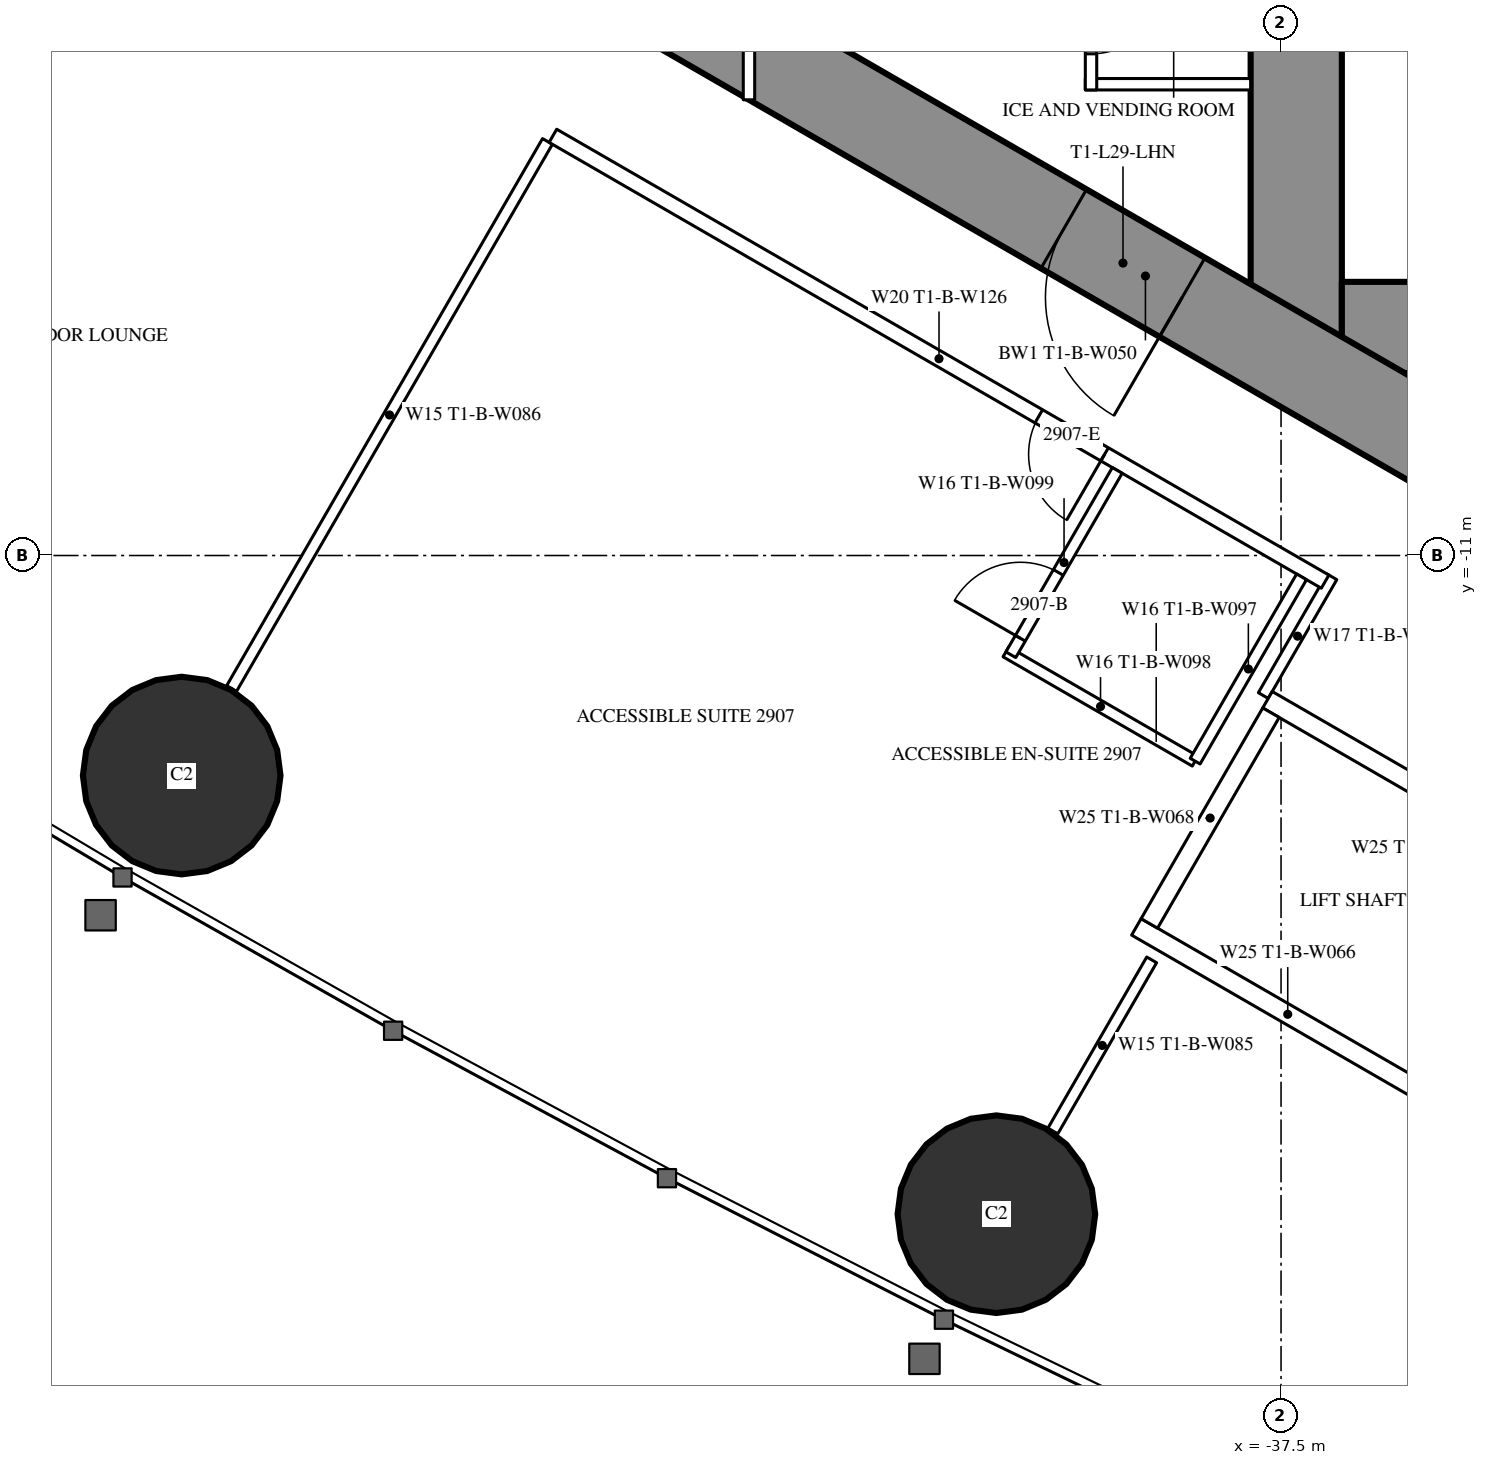
"""IFC4 building model, lengths in metres.
Left out: names, types, materials, properties, quantities, classifications, styles, units other than length and angle.
Written with IfcOpenShell. Run it as: python <this file> out.ifc"""

import sys

from ifc_helpers import new_model, si_unit, direction, frame, frame_2d, origin, origin_2d, place, context, subcontext, project, spatial, rectangle, hollow_circle, extrude, element, fill, save


model = new_model("IFC4")
c1 = context("Model", 3, precision=1e-05, world=origin(), true_north=direction((0.0, 1.0)))
c2 = subcontext(c1, "Body", "Model", "MODEL_VIEW")
j1 = project(units=[si_unit("LENGTHUNIT", "METRE"), si_unit("PLANEANGLEUNIT", "RADIAN")], contexts=[c1])
p1 = place(None, origin())
s1 = spatial("IfcSite", under=j1, at=p1, CompositionType="ELEMENT")
p2 = place(p1, origin())
s2 = spatial("IfcBuilding", under=s1, at=p2, CompositionType="ELEMENT")
p3 = place(p2, frame((0.0, 0.0, 111.6)))
s3 = spatial("IfcBuildingStorey", under=s2, at=p3, CompositionType="ELEMENT", Elevation=111.6)
for number, where, z_axis, x_axis in (
    (1, (-51.963, -13.895, 0.0), (0.0, 0.0, 1.0), (1.0, 0.0, 0.0)),
    (2, (-41.245, -19.666, 0.0), (0.0, 0.0, 1.0), (1.0, 0.0, 0.0)),
):
    element("IfcColumn", number, at=place(p3, frame(where, z_axis=z_axis, x_axis=x_axis)), inside=s3, PredefinedType="COLUMN", context=c2, shape_type="SweptSolid", body=[
        extrude(hollow_circle(Radius=1.3, WallThickness=0.1, at=origin_2d()), origin(), (0.0, 0.0, 1.0), 3.5),
    ])
p4 = place(p3, frame((-37.3, 8.6, 0.0), z_axis=(0.0, 0.0, 1.0), x_axis=(0.0, -1.0, 0.0)))
e3 = element("IfcWall", 3, at=p4, inside=s3, PredefinedType="SHEAR", context=c2, shape_type="SweptSolid", body=[
    extrude(rectangle(XDim=17.2, YDim=1.2, at=frame_2d((8.6, 0.0))), origin(), (0.0, 0.0, 1.0), 3.5),
])
p5 = place(p4, frame((7.7, 0.0, 0.0)))
e4 = element("IfcOpeningElement", 4, at=p5, cuts=e3, PredefinedType="OPENING", context=c2, shape_type="SweptSolid", body=[
    extrude(rectangle(XDim=1.8, YDim=2.2, at=frame_2d((0.9, 1.1))), frame((0.0, 0.61, 0.0), z_axis=(0.0, -1.0, 0.0), x_axis=(1.0, 0.0, 0.0)), (0.0, 0.0, 1.0), 1.22),
])
p6 = place(p3, frame((-28.3, -8.0, 0.0), z_axis=(0.0, 0.0, 1.0), x_axis=(-1.0, 0.0, 0.0)))
e5 = element("IfcWall", 5, at=p6, inside=s3, PredefinedType="SHEAR", context=c2, shape_type="SweptSolid", body=[
    extrude(rectangle(XDim=8.4, YDim=1.2, at=frame_2d((4.2, 0.0))), origin(), (0.0, 0.0, 1.0), 3.5),
])
p7 = place(p6, frame((0.25, 0.0, 0.0)))
e6 = element("IfcOpeningElement", 6, at=p7, cuts=e5, PredefinedType="OPENING", context=c2, shape_type="SweptSolid", body=[
    extrude(rectangle(XDim=1.0, YDim=2.2, at=frame_2d((0.5, 1.1))), frame((0.0, 0.61, 0.0), z_axis=(0.0, -1.0, 0.0), x_axis=(1.0, 0.0, 0.0)), (0.0, 0.0, 1.0), 1.22),
])
p8 = place(p3, frame((-27.2, -14.3, 0.0), z_axis=(0.0, 0.0, 1.0), x_axis=(-0.866024021859, 0.500002393557, 0.0)))
e7 = element("IfcWall", 7, at=p8, inside=s3, PredefinedType="SHEAR", context=c2, shape_type="SweptSolid", body=[
    extrude(rectangle(XDim=27.907, YDim=1.2, at=frame_2d((13.954, 0.0))), origin(), (0.0, 0.0, 1.0), 3.5),
])
p9 = place(p8, frame((4.6, 0.0, 0.0)))
e8 = element("IfcOpeningElement", 8, at=p9, cuts=e7, PredefinedType="OPENING", context=c2, shape_type="SweptSolid", body=[
    extrude(rectangle(XDim=1.0, YDim=2.2, at=frame_2d((0.5, 1.1))), frame((0.0, 0.61, 0.0), z_axis=(0.0, -1.0, 0.0), x_axis=(1.0, 0.0, 0.0)), (0.0, 0.0, 1.0), 1.22),
])
p10 = place(p8, frame((13.395, 0.0, 0.0)))
e9 = element("IfcOpeningElement", 9, at=p10, cuts=e7, PredefinedType="OPENING", context=c2, shape_type="SweptSolid", body=[
    extrude(rectangle(XDim=1.8, YDim=2.2, at=frame_2d((0.9, 1.1))), frame((0.0, 0.61, 0.0), z_axis=(0.0, -1.0, 0.0), x_axis=(1.0, 0.0, 0.0)), (0.0, 0.0, 1.0), 1.22),
])
p11 = place(p3, frame((-47.151, -5.552, 0.0), z_axis=(0.0, 0.0, 1.0), x_axis=(-0.500003012045, -0.866023664773, 0.0)))
e10 = element("IfcWall", 10, at=p11, inside=s3, PredefinedType="PARTITIONING", context=c2, shape_type="SweptSolid", body=[
    extrude(rectangle(XDim=8.311, YDim=0.15, at=frame_2d((4.156, 0.0))), origin(), (0.0, 0.0, 1.0), 2.2),
])
p12 = place(p3, frame((-39.202, -16.32, 0.0), z_axis=(0.0, 0.0, 1.0), x_axis=(-0.49997716683, -0.86603858612, 0.0)))
e11 = element("IfcWall", 11, at=p12, inside=s3, PredefinedType="PARTITIONING", context=c2, shape_type="SweptSolid", body=[
    extrude(rectangle(XDim=2.6, YDim=0.15, at=frame_2d((1.3, 0.0))), origin(), (0.0, 0.0, 1.0), 3.25),
])
p13 = place(p3, frame((-36.831, -11.28, 0.0), z_axis=(0.0, 0.0, 1.0), x_axis=(-0.499937177781, -0.866061671171, 0.0)))
e12 = element("IfcWall", 12, at=p13, inside=s3, PredefinedType="PARTITIONING", context=c2, shape_type="SweptSolid", body=[
    extrude(rectangle(XDim=1.804, YDim=0.15, at=frame_2d((0.902, 0.0))), origin(), (0.0, 0.0, 1.0), 3.25),
])
p14 = place(p3, frame((-36.92, -11.344, 0.0), z_axis=(0.0, 0.0, 1.0), x_axis=(-0.866027897759, 0.499995680284, 0.0)))
e13 = element("IfcWall", 13, at=p14, inside=s3, PredefinedType="PARTITIONING", context=c2, shape_type="SweptSolid", body=[
    extrude(rectangle(XDim=11.731, YDim=0.2, at=frame_2d((5.865, 0.0))), origin(), (0.0, 0.0, 1.0), 3.25),
])
p15 = place(p14, frame((3.35, 0.0, 0.0)))
e14 = element("IfcOpeningElement", 14, at=p15, cuts=e13, PredefinedType="OPENING", context=c2, shape_type="SweptSolid", body=[
    extrude(rectangle(XDim=1.0, YDim=2.2, at=frame_2d((0.5, 1.1))), frame((0.0, 0.11, 0.0), z_axis=(0.0, -1.0, 0.0), x_axis=(1.0, 0.0, 0.0)), (0.0, 0.0, 1.0), 0.22),
])
p16 = place(p3, frame((-38.63, -13.705, 0.0), z_axis=(0.0, 0.0, 1.0), x_axis=(-0.866018712932, 0.500011588718, 0.0)))
e15 = element("IfcWall", 15, at=p16, inside=s3, PredefinedType="PARTITIONING", context=c2, shape_type="SweptSolid", body=[
    extrude(rectangle(XDim=2.875, YDim=0.15, at=frame_2d((1.438, 0.0))), origin(), (0.0, 0.0, 1.0), 3.25),
])
p17 = place(p3, frame((-39.655, -9.88, 0.0), z_axis=(0.0, 0.0, 1.0), x_axis=(-0.500049511043, -0.865996816683, 0.0)))
e16 = element("IfcWall", 16, at=p17, inside=s3, PredefinedType="PARTITIONING", context=c2, shape_type="SweptSolid", body=[
    extrude(rectangle(XDim=2.8, YDim=0.15, at=frame_2d((1.4, 0.0))), origin(), (0.0, 0.0, 1.0), 3.25),
])
p18 = place(p17, frame((1.55, 0.0, 0.0)))
e17 = element("IfcOpeningElement", 17, at=p18, cuts=e16, PredefinedType="OPENING", context=c2, shape_type="SweptSolid", body=[
    extrude(rectangle(XDim=1.0, YDim=2.2, at=frame_2d((0.5, 1.1))), frame((0.0, 0.085, 0.0), z_axis=(0.0, -1.0, 0.0), x_axis=(1.0, 0.0, 0.0)), (0.0, 0.0, 1.0), 0.17),
])
p19 = place(p3, frame((-37.23, -11.281, 0.0), z_axis=(0.0, 0.0, 1.0), x_axis=(-0.500049511043, -0.865996816683, 0.0)))
e18 = element("IfcWall", 18, at=p19, inside=s3, PredefinedType="PARTITIONING", context=c2, shape_type="SweptSolid", body=[
    extrude(rectangle(XDim=2.8, YDim=0.15, at=frame_2d((1.4, 0.0))), origin(), (0.0, 0.0, 1.0), 3.25),
])
p20 = place(p3, frame((-37.9, -4.8, 0.0), z_axis=(0.0, 0.0, 1.0), x_axis=(-1.0, 0.0, 0.0)))
e19 = element("IfcWall", 19, at=p20, inside=s3, PredefinedType="PARTITIONING", context=c2, shape_type="SweptSolid", body=[
    extrude(rectangle(XDim=2.175, YDim=0.15, at=frame_2d((1.087, 0.0))), origin(), (0.0, 0.0, 1.0), 3.25),
])
p21 = place(p3, frame((-40.0, -2.925, 0.0), z_axis=(0.0, 0.0, 1.0), x_axis=(0.0, -1.0, 0.0)))
e20 = element("IfcWall", 20, at=p21, inside=s3, PredefinedType="PARTITIONING", context=c2, shape_type="SweptSolid", body=[
    extrude(rectangle(XDim=1.95, YDim=0.15, at=frame_2d((0.975, 0.0))), origin(), (0.0, 0.0, 1.0), 3.25),
])
p22 = place(p21, frame((0.475, 0.0, 0.0)))
e21 = element("IfcOpeningElement", 21, at=p22, cuts=e20, PredefinedType="OPENING", context=c2, shape_type="SweptSolid", body=[
    extrude(rectangle(XDim=1.0, YDim=2.2, at=frame_2d((0.5, 1.1))), frame((0.0, 0.085, 0.0), z_axis=(0.0, -1.0, 0.0), x_axis=(1.0, 0.0, 0.0)), (0.0, 0.0, 1.0), 0.17),
])
p23 = place(p3, frame((-44.5, 5.005, 0.0), z_axis=(0.0, 0.0, 1.0), x_axis=(0.0, -1.0, 0.0)))
e22 = element("IfcWall", 22, at=p23, inside=s3, PredefinedType="PARTITIONING", context=c2, shape_type="SweptSolid", body=[
    extrude(rectangle(XDim=10.009, YDim=0.15, at=frame_2d((5.005, 0.0))), origin(), (0.0, 0.0, 1.0), 2.45),
])
p24 = place(p23, frame((2.002, 0.0, 0.0)))
e23 = element("IfcOpeningElement", 23, at=p24, cuts=e22, PredefinedType="OPENING", context=c2, shape_type="SweptSolid", body=[
    extrude(rectangle(XDim=1.0, YDim=2.2, at=frame_2d((0.5, 1.1))), frame((0.0, 0.085, 0.0), z_axis=(0.0, -1.0, 0.0), x_axis=(1.0, 0.0, 0.0)), (0.0, 0.0, 1.0), 0.17),
])
p25 = place(p23, frame((7.007, 0.0, 0.0)))
e24 = element("IfcOpeningElement", 24, at=p25, cuts=e22, PredefinedType="OPENING", context=c2, shape_type="SweptSolid", body=[
    extrude(rectangle(XDim=1.0, YDim=2.2, at=frame_2d((0.5, 1.1))), frame((0.0, 0.085, 0.0), z_axis=(0.0, -1.0, 0.0), x_axis=(1.0, 0.0, 0.0)), (0.0, 0.0, 1.0), 0.17),
])
p26 = place(p3, frame((-33.696, -15.197, 0.0), z_axis=(0.0, 0.0, 1.0), x_axis=(-0.865976953817, 0.500083908417, 0.0)))
e25 = element("IfcWall", 25, at=p26, inside=s3, PredefinedType="PARTITIONING", context=c2, shape_type="SweptSolid", body=[
    extrude(rectangle(XDim=4.599, YDim=0.25, at=frame_2d((2.3, 0.0))), origin(), (0.0, 0.0, 1.0), 3.25),
])
p27 = place(p3, frame((-35.42, -18.186, 0.0), z_axis=(0.0, 0.0, 1.0), x_axis=(-0.865990227814, 0.50006092162, 0.0)))
e26 = element("IfcWall", 26, at=p27, inside=s3, PredefinedType="PARTITIONING", context=c2, shape_type="SweptSolid", body=[
    extrude(rectangle(XDim=4.6, YDim=0.25, at=frame_2d((2.3, 0.0))), origin(), (0.0, 0.0, 1.0), 3.25),
])
p28 = place(p3, frame((-37.633, -13.068, 0.0), z_axis=(0.0, 0.0, 1.0), x_axis=(-0.499872130319, -0.866099216793, 0.0)))
e27 = element("IfcWall", 27, at=p28, inside=s3, PredefinedType="PARTITIONING", context=c2, shape_type="SweptSolid", body=[
    extrude(rectangle(XDim=3.2, YDim=0.25, at=frame_2d((1.6, 0.0))), origin(), (0.0, 0.0, 1.0), 3.25),
])
p29 = place(p18, origin())
e28 = element("IfcDoor", 28, at=p29, inside=s3, OperationType="SINGLE_SWING_RIGHT", PredefinedType="DOOR", context=c2, shape_type="SweptSolid", body=[
    extrude(rectangle(XDim=1.0, YDim=2.2, at=frame_2d((0.5, 1.1))), frame((0.0, 0.025, 0.0), z_axis=(0.0, -1.0, 0.0), x_axis=(1.0, 0.0, 0.0)), (0.0, 0.0, 1.0), 0.05),
])
fill(e17, e28)
p30 = place(p15, origin())
e29 = element("IfcDoor", 29, at=p30, inside=s3, OperationType="SINGLE_SWING_LEFT", PredefinedType="DOOR", context=c2, shape_type="SweptSolid", body=[
    extrude(rectangle(XDim=1.0, YDim=2.2, at=frame_2d((0.5, 1.1))), frame((0.0, 0.025, 0.0), z_axis=(0.0, -1.0, 0.0), x_axis=(1.0, 0.0, 0.0)), (0.0, 0.0, 1.0), 0.05),
])
fill(e14, e29)
p31 = place(p22, origin())
e30 = element("IfcDoor", 30, at=p31, inside=s3, OperationType="SINGLE_SWING_LEFT", PredefinedType="DOOR", context=c2, shape_type="SweptSolid", body=[
    extrude(rectangle(XDim=1.0, YDim=2.2, at=frame_2d((0.5, 1.1))), frame((0.0, 0.025, 0.0), z_axis=(0.0, -1.0, 0.0), x_axis=(1.0, 0.0, 0.0)), (0.0, 0.0, 1.0), 0.05),
])
fill(e21, e30)
p32 = place(p10, origin())
e31 = element("IfcDoor", 31, at=p32, inside=s3, OperationType="DOUBLE_DOOR_SINGLE_SWING", PredefinedType="DOOR", context=c2, shape_type="SweptSolid", body=[
    extrude(rectangle(XDim=1.8, YDim=2.2, at=frame_2d((0.9, 1.1))), frame((0.0, 0.025, 0.0), z_axis=(0.0, -1.0, 0.0), x_axis=(1.0, 0.0, 0.0)), (0.0, 0.0, 1.0), 0.05),
])
fill(e9, e31)
save(model, sys.argv[1])
